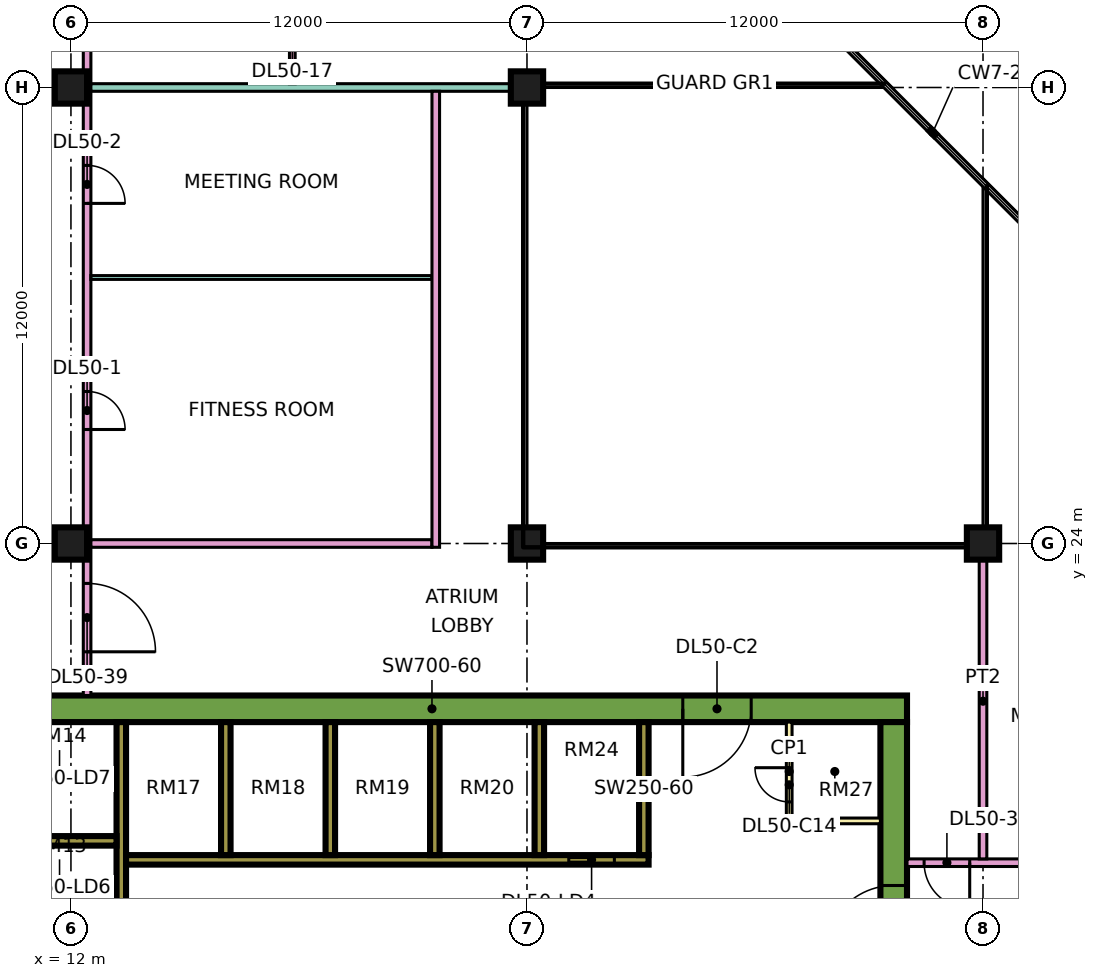
"""IFC4 building model, lengths in metres.
Left out: names, types, materials, properties, quantities, classifications, styles, units other than length and angle.
Written with IfcOpenShell. Run it as: python <this file> out.ifc"""

import sys

from ifc_helpers import new_model, si_unit, direction, frame, frame_2d, origin, origin_2d, place, context, subcontext, project, spatial, rectangle, extrude, element, fill, save


model = new_model("IFC4")
c1 = context("Model", 3, precision=1e-05, world=origin(), true_north=direction((0.0, 1.0)))
c2 = subcontext(c1, "Body", "Model", "MODEL_VIEW")
j1 = project(units=[si_unit("LENGTHUNIT", "METRE"), si_unit("PLANEANGLEUNIT", "RADIAN")], contexts=[c1])
p1 = place(None, origin())
s1 = spatial("IfcSite", under=j1, at=p1, CompositionType="ELEMENT")
p2 = place(p1, origin())
s2 = spatial("IfcBuilding", under=s1, at=p2, CompositionType="ELEMENT")
p3 = place(p2, frame((0.0, 0.0, 215.4)))
s3 = spatial("IfcBuildingStorey", under=s2, at=p3, CompositionType="ELEMENT", Elevation=215.4)
for number, where, z_axis, x_axis in (
    (1, (12.0, 24.0, 0.0), (0.0, 0.0, 1.0), (1.0, 0.0, 0.0)),
    (2, (12.0, 36.0, 0.0), (0.0, 0.0, 1.0), (1.0, 0.0, 0.0)),
    (3, (24.0, 24.0, 0.0), (0.0, 0.0, 1.0), (1.0, 0.0, 0.0)),
    (4, (24.0, 36.0, 0.0), (0.0, 0.0, 1.0), (1.0, 0.0, 0.0)),
    (5, (36.0, 24.0, 0.0), (0.0, 0.0, 1.0), (1.0, 0.0, 0.0)),
):
    element("IfcColumn", number, at=place(p3, frame(where, z_axis=z_axis, x_axis=x_axis)), inside=s3, PredefinedType="COLUMN", context=c2, shape_type="SweptSolid", body=[
        extrude(rectangle(XDim=0.85, YDim=0.85, at=origin_2d()), origin(), (0.0, 0.0, 1.0), 3.75),
    ])
p4 = place(p3, frame((9.0, 19.65, 0.0), z_axis=(0.0, 0.0, 1.0), x_axis=(1.0, 0.0, 0.0)))
e6 = element("IfcWall", 6, at=p4, inside=s3, PredefinedType="SHEAR", context=c2, shape_type="SweptSolid", body=[
    extrude(rectangle(XDim=25.0, YDim=0.7, at=frame_2d((12.5, 0.0))), origin(), (0.0, 0.0, 1.0), 3.75),
])
p5 = place(p4, frame((19.1, 0.0, 0.0)))
e7 = element("IfcOpeningElement", 7, at=p5, cuts=e6, PredefinedType="OPENING", context=c2, shape_type="SweptSolid", body=[
    extrude(rectangle(XDim=1.8, YDim=2.4, at=frame_2d((0.9, 1.2))), frame((0.0, 0.36, 0.0), z_axis=(0.0, -1.0, 0.0), x_axis=(1.0, 0.0, 0.0)), (0.0, 0.0, 1.0), 0.72),
])
p6 = place(p3, frame((33.65, 7.7, 0.0), z_axis=(0.0, 0.0, 1.0), x_axis=(0.0, 1.0, 0.0)))
e8 = element("IfcWall", 8, at=p6, inside=s3, PredefinedType="SHEAR", context=c2, shape_type="SweptSolid", body=[
    extrude(rectangle(XDim=11.6, YDim=0.7, at=frame_2d((5.8, 0.0))), origin(), (0.0, 0.0, 1.0), 3.75),
])
p7 = place(p6, frame((5.5, 0.0, 0.0)))
e9 = element("IfcOpeningElement", 9, at=p7, cuts=e8, PredefinedType="OPENING", context=c2, shape_type="SweptSolid", body=[
    extrude(rectangle(XDim=1.8, YDim=2.4, at=frame_2d((0.9, 1.2))), frame((0.0, 0.36, 0.0), z_axis=(0.0, -1.0, 0.0), x_axis=(1.0, 0.0, 0.0)), (0.0, 0.0, 1.0), 0.72),
])
p8 = place(p3, frame((13.325, 7.7, 0.0), z_axis=(0.0, 0.0, 1.0), x_axis=(0.0, 1.0, 0.0)))
e10 = element("IfcWall", 10, at=p8, inside=s3, PredefinedType="SHEAR", context=c2, shape_type="SweptSolid", body=[
    extrude(rectangle(XDim=11.6, YDim=0.25, at=frame_2d((5.8, 0.0))), origin(), (0.0, 0.0, 1.0), 3.75),
])
p9 = place(p3, frame((13.45, 15.675, 0.0), z_axis=(0.0, 0.0, 1.0), x_axis=(1.0, 0.0, 0.0)))
e11 = element("IfcWall", 11, at=p9, inside=s3, PredefinedType="SHEAR", context=c2, shape_type="SweptSolid", body=[
    extrude(rectangle(XDim=13.75, YDim=0.25, at=frame_2d((6.875, 0.0))), origin(), (0.0, 0.0, 1.0), 3.75),
])
p10 = place(p9, frame((11.65, 0.0, 0.0)))
e12 = element("IfcOpeningElement", 12, at=p10, cuts=e11, PredefinedType="OPENING", context=c2, shape_type="SweptSolid", body=[
    extrude(rectangle(XDim=1.2, YDim=2.2, at=frame_2d((0.6, 1.1))), frame((0.0, 0.135, 0.0), z_axis=(0.0, -1.0, 0.0), x_axis=(1.0, 0.0, 0.0)), (0.0, 0.0, 1.0), 0.27),
])
p11 = place(p3, frame((10.2, 16.175, 0.0), z_axis=(0.0, 0.0, 1.0), x_axis=(1.0, 0.0, 0.0)))
e13 = element("IfcWall", 13, at=p11, inside=s3, PredefinedType="SHEAR", context=c2, shape_type="SweptSolid", body=[
    extrude(rectangle(XDim=3.0, YDim=0.25, at=frame_2d((1.5, 0.0))), origin(), (0.0, 0.0, 1.0), 3.75),
])
for number, where, z_axis, x_axis in (
    (14, (16.075, 15.8, 0.0), (0.0, 0.0, 1.0), (0.0, 1.0, 0.0)),
    (15, (18.825, 15.8, 0.0), (0.0, 0.0, 1.0), (0.0, 1.0, 0.0)),
    (16, (21.575, 15.8, 0.0), (0.0, 0.0, 1.0), (0.0, 1.0, 0.0)),
    (17, (24.325, 15.8, 0.0), (0.0, 0.0, 1.0), (0.0, 1.0, 0.0)),
    (18, (27.075, 15.8, 0.0), (0.0, 0.0, 1.0), (0.0, 1.0, 0.0)),
):
    element("IfcWall", number, at=place(p3, frame(where, z_axis=z_axis, x_axis=x_axis)), inside=s3, PredefinedType="SHEAR", context=c2, shape_type="SweptSolid", body=[
        extrude(rectangle(XDim=3.5, YDim=0.25, at=frame_2d((1.75, 0.0))), origin(), (0.0, 0.0, 1.0), 3.75),
    ])
p12 = place(p3, frame((30.9, 16.7, 0.0), z_axis=(0.0, 0.0, 1.0), x_axis=(0.0, 1.0, 0.0)))
e19 = element("IfcWall", 19, at=p12, inside=s3, PredefinedType="PARTITIONING", context=c2, shape_type="SweptSolid", body=[
    extrude(rectangle(XDim=2.6, YDim=0.15, at=frame_2d((1.3, 0.0))), origin(), (0.0, 0.0, 1.0), 3.35),
])
p13 = place(p12, frame((0.5, 0.0, 0.0)))
e20 = element("IfcOpeningElement", 20, at=p13, cuts=e19, PredefinedType="OPENING", context=c2, shape_type="SweptSolid", body=[
    extrude(rectangle(XDim=0.9, YDim=2.1, at=frame_2d((0.45, 1.05))), frame((0.0, 0.085, 0.0), z_axis=(0.0, -1.0, 0.0), x_axis=(1.0, 0.0, 0.0)), (0.0, 0.0, 1.0), 0.17),
])
p14 = place(p3, frame((30.9, 16.7, 0.0), z_axis=(0.0, 0.0, 1.0), x_axis=(1.0, 0.0, 0.0)))
e21 = element("IfcWall", 21, at=p14, inside=s3, PredefinedType="PARTITIONING", context=c2, shape_type="SweptSolid", body=[
    extrude(rectangle(XDim=2.4, YDim=0.15, at=frame_2d((1.2, 0.0))), origin(), (0.0, 0.0, 1.0), 3.35),
])
p15 = place(p3, frame((12.425, 20.0, 0.0), z_axis=(0.0, 0.0, 1.0), x_axis=(0.0, 1.0, 0.0)))
e22 = element("IfcWall", 22, at=p15, inside=s3, PredefinedType="PARTITIONING", context=c2, shape_type="SweptSolid", body=[
    extrude(rectangle(XDim=42.926, YDim=0.2, at=frame_2d((21.463, 0.0))), origin(), (0.0, 0.0, 1.0), 3.35),
])
p16 = place(p15, frame((7.0, 0.0, 0.0)))
e23 = element("IfcOpeningElement", 23, at=p16, cuts=e22, PredefinedType="OPENING", context=c2, shape_type="SweptSolid", body=[
    extrude(rectangle(XDim=1.0, YDim=2.1, at=frame_2d((0.5, 1.05))), frame((0.0, 0.11, 0.0), z_axis=(0.0, -1.0, 0.0), x_axis=(1.0, 0.0, 0.0)), (0.0, 0.0, 1.0), 0.22),
])
p17 = place(p15, frame((12.95, 0.0, 0.0)))
e24 = element("IfcOpeningElement", 24, at=p17, cuts=e22, PredefinedType="OPENING", context=c2, shape_type="SweptSolid", body=[
    extrude(rectangle(XDim=1.0, YDim=2.1, at=frame_2d((0.5, 1.05))), frame((0.0, 0.11, 0.0), z_axis=(0.0, -1.0, 0.0), x_axis=(1.0, 0.0, 0.0)), (0.0, 0.0, 1.0), 0.22),
])
p18 = place(p15, frame((23.35, 0.0, 0.0)))
e25 = element("IfcOpeningElement", 25, at=p18, cuts=e22, PredefinedType="OPENING", context=c2, shape_type="SweptSolid", body=[
    extrude(rectangle(XDim=1.0, YDim=2.1, at=frame_2d((0.5, 1.05))), frame((0.0, 0.11, 0.0), z_axis=(0.0, -1.0, 0.0), x_axis=(1.0, 0.0, 0.0)), (0.0, 0.0, 1.0), 0.22),
])
p19 = place(p15, frame((35.2, 0.0, 0.0)))
e26 = element("IfcOpeningElement", 26, at=p19, cuts=e22, PredefinedType="OPENING", context=c2, shape_type="SweptSolid", body=[
    extrude(rectangle(XDim=1.0, YDim=2.1, at=frame_2d((0.5, 1.05))), frame((0.0, 0.11, 0.0), z_axis=(0.0, -1.0, 0.0), x_axis=(1.0, 0.0, 0.0)), (0.0, 0.0, 1.0), 0.22),
])
p20 = place(p15, frame((1.15, 0.0, 0.0)))
e27 = element("IfcOpeningElement", 27, at=p20, cuts=e22, PredefinedType="OPENING", context=c2, shape_type="SweptSolid", body=[
    extrude(rectangle(XDim=1.8, YDim=2.1, at=frame_2d((0.9, 1.05))), frame((0.0, 0.11, 0.0), z_axis=(0.0, -1.0, 0.0), x_axis=(1.0, 0.0, 0.0)), (0.0, 0.0, 1.0), 0.22),
])
p21 = place(p15, frame((28.6, 0.0, 0.0)))
e28 = element("IfcOpeningElement", 28, at=p21, cuts=e22, PredefinedType="OPENING", context=c2, shape_type="SweptSolid", body=[
    extrude(rectangle(XDim=1.8, YDim=2.1, at=frame_2d((0.9, 1.05))), frame((0.0, 0.11, 0.0), z_axis=(0.0, -1.0, 0.0), x_axis=(1.0, 0.0, 0.0)), (0.0, 0.0, 1.0), 0.22),
])
p22 = place(p3, frame((12.525, 24.0, 0.0), z_axis=(0.0, 0.0, 1.0), x_axis=(1.0, 0.0, 0.0)))
e29 = element("IfcWall", 29, at=p22, inside=s3, PredefinedType="PARTITIONING", context=c2, shape_type="SweptSolid", body=[
    extrude(rectangle(XDim=8.975, YDim=0.2, at=frame_2d((4.488, 0.0))), origin(), (0.0, 0.0, 1.0), 3.35),
])
p23 = place(p3, frame((12.525, 31.0, 0.0), z_axis=(0.0, 0.0, 1.0), x_axis=(1.0, 0.0, 0.0)))
e30 = element("IfcWall", 30, at=p23, inside=s3, PredefinedType="PARTITIONING", context=c2, shape_type="SweptSolid", body=[
    extrude(rectangle(XDim=8.975, YDim=0.1, at=frame_2d((4.488, 0.0))), origin(), (0.0, 0.0, 1.0), 3.35),
])
p24 = place(p3, frame((12.525, 36.0, 0.0), z_axis=(0.0, 0.0, 1.0), x_axis=(1.0, 0.0, 0.0)))
e31 = element("IfcWall", 31, at=p24, inside=s3, PredefinedType="PARTITIONING", context=c2, shape_type="SweptSolid", body=[
    extrude(rectangle(XDim=11.475, YDim=0.2, at=frame_2d((5.738, 0.0))), origin(), (0.0, 0.0, 1.0), 3.35),
])
p25 = place(p3, frame((17.825, 36.1, 0.0), z_axis=(0.0, 0.0, 1.0), x_axis=(0.0, 1.0, 0.0)))
e32 = element("IfcWall", 32, at=p25, inside=s3, PredefinedType="PARTITIONING", context=c2, shape_type="SweptSolid", body=[
    extrude(rectangle(XDim=6.575, YDim=0.15, at=frame_2d((3.288, 0.0))), origin(), (0.0, 0.0, 1.0), 3.35),
])
p26 = place(p25, frame((4.35, 0.0, 0.0)))
e33 = element("IfcOpeningElement", 33, at=p26, cuts=e32, PredefinedType="OPENING", context=c2, shape_type="SweptSolid", body=[
    extrude(rectangle(XDim=0.8, YDim=2.1, at=frame_2d((0.4, 1.05))), frame((0.0, 0.085, 0.0), z_axis=(0.0, -1.0, 0.0), x_axis=(1.0, 0.0, 0.0)), (0.0, 0.0, 1.0), 0.17),
])
p27 = place(p25, frame((0.95, 0.0, 0.0)))
e34 = element("IfcOpeningElement", 34, at=p27, cuts=e32, PredefinedType="OPENING", context=c2, shape_type="SweptSolid", body=[
    extrude(rectangle(XDim=0.9, YDim=2.1, at=frame_2d((0.45, 1.05))), frame((0.0, 0.085, 0.0), z_axis=(0.0, -1.0, 0.0), x_axis=(1.0, 0.0, 0.0)), (0.0, 0.0, 1.0), 0.17),
])
p28 = place(p3, frame((21.6, 23.9, 0.0), z_axis=(0.0, 0.0, 1.0), x_axis=(0.0, 1.0, 0.0)))
e35 = element("IfcWall", 35, at=p28, inside=s3, PredefinedType="PARTITIONING", context=c2, shape_type="SweptSolid", body=[
    extrude(rectangle(XDim=12.0, YDim=0.2, at=frame_2d((6.0, 0.0))), origin(), (0.0, 0.0, 1.0), 3.35),
])
p29 = place(p3, frame((34.0, 15.6, 0.0), z_axis=(0.0, 0.0, 1.0), x_axis=(1.0, 0.0, 0.0)))
e36 = element("IfcWall", 36, at=p29, inside=s3, PredefinedType="PARTITIONING", context=c2, shape_type="SweptSolid", body=[
    extrude(rectangle(XDim=10.35, YDim=0.2, at=frame_2d((5.175, 0.0))), origin(), (0.0, 0.0, 1.0), 3.35),
])
p30 = place(p29, frame((5.6, 0.0, 0.0)))
e37 = element("IfcOpeningElement", 37, at=p30, cuts=e36, PredefinedType="OPENING", context=c2, shape_type="SweptSolid", body=[
    extrude(rectangle(XDim=1.0, YDim=2.1, at=frame_2d((0.5, 1.05))), frame((0.0, 0.11, 0.0), z_axis=(0.0, -1.0, 0.0), x_axis=(1.0, 0.0, 0.0)), (0.0, 0.0, 1.0), 0.22),
])
p31 = place(p29, frame((0.45, 0.0, 0.0)))
e38 = element("IfcOpeningElement", 38, at=p31, cuts=e36, PredefinedType="OPENING", context=c2, shape_type="SweptSolid", body=[
    extrude(rectangle(XDim=1.2, YDim=2.1, at=frame_2d((0.6, 1.05))), frame((0.0, 0.11, 0.0), z_axis=(0.0, -1.0, 0.0), x_axis=(1.0, 0.0, 0.0)), (0.0, 0.0, 1.0), 0.22),
])
p32 = place(p3, frame((36.0, 15.7, 0.0), z_axis=(0.0, 0.0, 1.0), x_axis=(0.0, 1.0, 0.0)))
e39 = element("IfcWall", 39, at=p32, inside=s3, PredefinedType="PARTITIONING", context=c2, shape_type="SweptSolid", body=[
    extrude(rectangle(XDim=8.3, YDim=0.2, at=frame_2d((4.15, 0.0))), origin(), (0.0, 0.0, 1.0), 3.35),
])
p33 = place(p10, origin())
e40 = element("IfcDoor", 40, at=p33, inside=s3, OperationType="DOUBLE_DOOR_SLIDING", PredefinedType="DOOR", context=c2, shape_type="SweptSolid", body=[
    extrude(rectangle(XDim=1.2, YDim=2.2, at=frame_2d((0.6, 1.1))), frame((0.0, 0.025, 0.0), z_axis=(0.0, -1.0, 0.0), x_axis=(1.0, 0.0, 0.0)), (0.0, 0.0, 1.0), 0.05),
])
fill(e12, e40)
p34 = place(p7, origin())
e41 = element("IfcDoor", 41, at=p34, inside=s3, OperationType="DOUBLE_DOOR_SINGLE_SWING", PredefinedType="DOOR", context=c2, shape_type="SweptSolid", body=[
    extrude(rectangle(XDim=1.8, YDim=2.4, at=frame_2d((0.9, 1.2))), frame((0.0, 0.025, 0.0), z_axis=(0.0, -1.0, 0.0), x_axis=(1.0, 0.0, 0.0)), (0.0, 0.0, 1.0), 0.05),
])
fill(e9, e41)
p35 = place(p5, frame((1.8, 0.0, 0.0), z_axis=(0.0, 0.0, 1.0), x_axis=(-1.0, 0.0, 0.0)))
e42 = element("IfcDoor", 42, at=p35, inside=s3, OperationType="DOUBLE_DOOR_SINGLE_SWING", PredefinedType="DOOR", context=c2, shape_type="SweptSolid", body=[
    extrude(rectangle(XDim=1.8, YDim=2.4, at=frame_2d((0.9, 1.2))), frame((0.0, 0.025, 0.0), z_axis=(0.0, -1.0, 0.0), x_axis=(1.0, 0.0, 0.0)), (0.0, 0.0, 1.0), 0.05),
])
fill(e7, e42)
p36 = place(p13, frame((0.9, 0.0, 0.0), z_axis=(0.0, 0.0, 1.0), x_axis=(-1.0, 0.0, 0.0)))
e43 = element("IfcDoor", 43, at=p36, inside=s3, OperationType="SINGLE_SWING_RIGHT", PredefinedType="DOOR", context=c2, shape_type="SweptSolid", body=[
    extrude(rectangle(XDim=0.9, YDim=2.1, at=frame_2d((0.45, 1.05))), frame((0.0, 0.025, 0.0), z_axis=(0.0, -1.0, 0.0), x_axis=(1.0, 0.0, 0.0)), (0.0, 0.0, 1.0), 0.05),
])
fill(e20, e43)
p37 = place(p16, frame((1.0, 0.0, 0.0), z_axis=(0.0, 0.0, 1.0), x_axis=(-1.0, 0.0, 0.0)))
e44 = element("IfcDoor", 44, at=p37, inside=s3, OperationType="SINGLE_SWING_LEFT", PredefinedType="DOOR", context=c2, shape_type="SweptSolid", body=[
    extrude(rectangle(XDim=1.0, YDim=2.1, at=frame_2d((0.5, 1.05))), frame((0.0, 0.025, 0.0), z_axis=(0.0, -1.0, 0.0), x_axis=(1.0, 0.0, 0.0)), (0.0, 0.0, 1.0), 0.05),
])
fill(e23, e44)
p38 = place(p17, frame((1.0, 0.0, 0.0), z_axis=(0.0, 0.0, 1.0), x_axis=(-1.0, 0.0, 0.0)))
e45 = element("IfcDoor", 45, at=p38, inside=s3, OperationType="SINGLE_SWING_LEFT", PredefinedType="DOOR", context=c2, shape_type="SweptSolid", body=[
    extrude(rectangle(XDim=1.0, YDim=2.1, at=frame_2d((0.5, 1.05))), frame((0.0, 0.025, 0.0), z_axis=(0.0, -1.0, 0.0), x_axis=(1.0, 0.0, 0.0)), (0.0, 0.0, 1.0), 0.05),
])
fill(e24, e45)
p39 = place(p31, origin())
e46 = element("IfcDoor", 46, at=p39, inside=s3, OperationType="SINGLE_SWING_RIGHT", PredefinedType="DOOR", context=c2, shape_type="SweptSolid", body=[
    extrude(rectangle(XDim=1.2, YDim=2.1, at=frame_2d((0.6, 1.05))), frame((0.0, 0.025, 0.0), z_axis=(0.0, -1.0, 0.0), x_axis=(1.0, 0.0, 0.0)), (0.0, 0.0, 1.0), 0.05),
])
fill(e38, e46)
p40 = place(p20, frame((1.8, 0.0, 0.0), z_axis=(0.0, 0.0, 1.0), x_axis=(-1.0, 0.0, 0.0)))
e47 = element("IfcDoor", 47, at=p40, inside=s3, OperationType="DOUBLE_DOOR_SINGLE_SWING", PredefinedType="DOOR", context=c2, shape_type="SweptSolid", body=[
    extrude(rectangle(XDim=1.8, YDim=2.1, at=frame_2d((0.9, 1.05))), frame((0.0, 0.025, 0.0), z_axis=(0.0, -1.0, 0.0), x_axis=(1.0, 0.0, 0.0)), (0.0, 0.0, 1.0), 0.05),
])
fill(e27, e47)
save(model, sys.argv[1])
